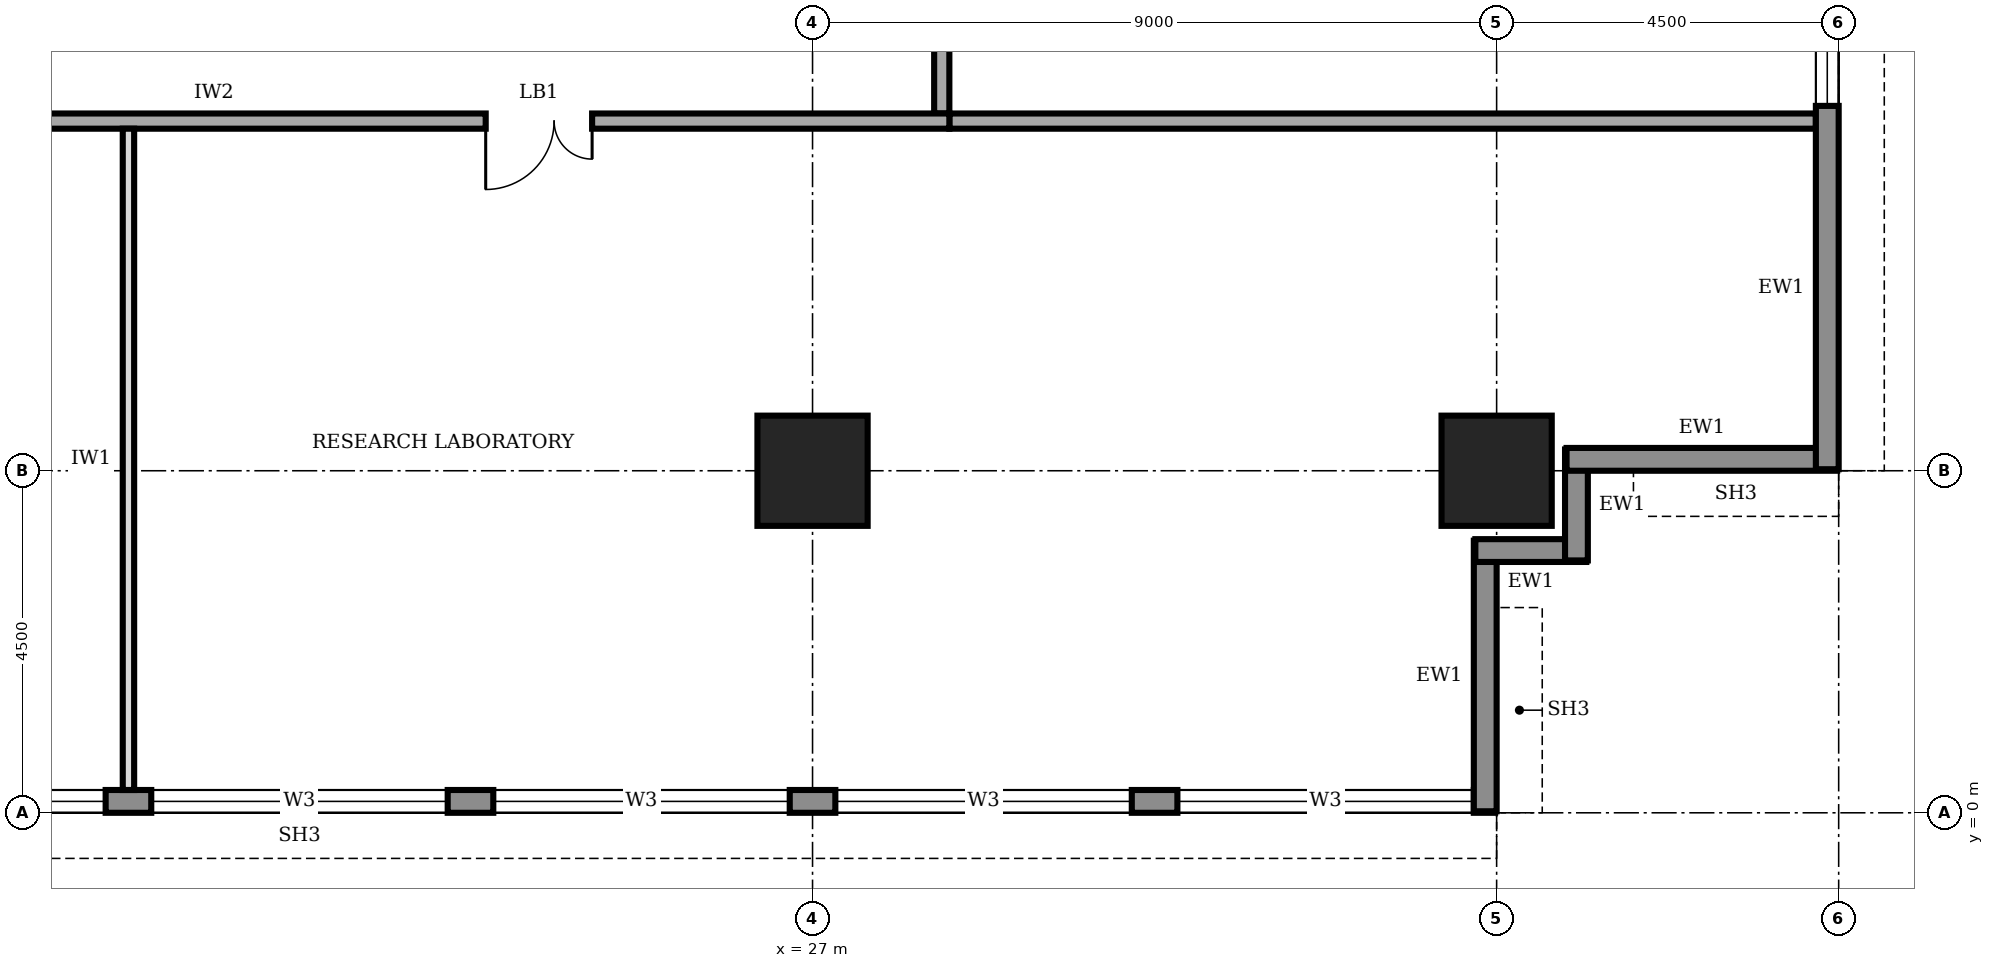
"""IFC4 building model, lengths in metres.
Left out: names, types, materials, properties, quantities, classifications, styles, units other than length and angle.
Written with IfcOpenShell. Run it as: python <this file> out.ifc"""

import sys

from ifc_helpers import new_model, si_unit, direction, frame, frame_2d, origin, origin_2d, place, context, subcontext, project, spatial, rectangle, extrude, element, fill, save


model = new_model("IFC4")
c1 = context("Model", 3, precision=1e-05, world=origin(), true_north=direction((0.0, 1.0)))
c2 = subcontext(c1, "Body", "Model", "MODEL_VIEW")
j1 = project(units=[si_unit("LENGTHUNIT", "METRE"), si_unit("PLANEANGLEUNIT", "RADIAN")], contexts=[c1])
p1 = place(None, origin())
s1 = spatial("IfcSite", under=j1, at=p1, CompositionType="ELEMENT")
p2 = place(p1, origin())
s2 = spatial("IfcBuilding", under=s1, at=p2, CompositionType="ELEMENT")
p3 = place(p2, frame((0.0, 0.0, 253.0)))
s3 = spatial("IfcBuildingStorey", under=s2, at=p3, CompositionType="ELEMENT", Elevation=253.0)
for number, where, z_axis, x_axis in (
    (1, (27.0, 4.5, 0.0), (0.0, 0.0, 1.0), (1.0, 0.0, 0.0)),
    (2, (36.0, 4.5, 0.0), (0.0, 0.0, 1.0), (1.0, 0.0, 0.0)),
):
    element("IfcColumn", number, at=place(p3, frame(where, z_axis=z_axis, x_axis=x_axis)), inside=s3, PredefinedType="COLUMN", context=c2, shape_type="SweptSolid", body=[
        extrude(rectangle(XDim=1.45, YDim=1.45, at=origin_2d()), origin(), (0.0, 0.0, 1.0), 4.0),
    ])
p4 = place(p3, frame((4.52, 0.15, 0.0), z_axis=(0.0, 0.0, 1.0), x_axis=(1.0, 0.0, 0.0)))
e3 = element("IfcWall", 3, at=p4, inside=s3, PredefinedType="STANDARD", context=c2, shape_type="SweptSolid", body=[
    extrude(rectangle(XDim=31.46, YDim=0.3, at=frame_2d((15.73, 0.0))), origin(), (0.0, 0.0, 1.0), 3.75),
])
p5 = place(p4, frame((4.78, 0.0, 0.95)))
e4 = element("IfcOpeningElement", 4, at=p5, cuts=e3, PredefinedType="OPENING", context=c2, shape_type="SweptSolid", body=[
    extrude(rectangle(XDim=3.9, YDim=1.8, at=frame_2d((1.95, 0.9))), frame((0.0, 0.16, 0.0), z_axis=(0.0, -1.0, 0.0), x_axis=(1.0, 0.0, 0.0)), (0.0, 0.0, 1.0), 0.32),
])
p6 = place(p4, frame((9.28, 0.0, 0.95)))
e5 = element("IfcOpeningElement", 5, at=p6, cuts=e3, PredefinedType="OPENING", context=c2, shape_type="SweptSolid", body=[
    extrude(rectangle(XDim=3.9, YDim=1.8, at=frame_2d((1.95, 0.9))), frame((0.0, 0.16, 0.0), z_axis=(0.0, -1.0, 0.0), x_axis=(1.0, 0.0, 0.0)), (0.0, 0.0, 1.0), 0.32),
])
p7 = place(p4, frame((13.78, 0.0, 0.95)))
e6 = element("IfcOpeningElement", 6, at=p7, cuts=e3, PredefinedType="OPENING", context=c2, shape_type="SweptSolid", body=[
    extrude(rectangle(XDim=3.9, YDim=1.8, at=frame_2d((1.95, 0.9))), frame((0.0, 0.16, 0.0), z_axis=(0.0, -1.0, 0.0), x_axis=(1.0, 0.0, 0.0)), (0.0, 0.0, 1.0), 0.32),
])
p8 = place(p4, frame((18.28, 0.0, 0.95)))
e7 = element("IfcOpeningElement", 7, at=p8, cuts=e3, PredefinedType="OPENING", context=c2, shape_type="SweptSolid", body=[
    extrude(rectangle(XDim=3.9, YDim=1.8, at=frame_2d((1.95, 0.9))), frame((0.0, 0.16, 0.0), z_axis=(0.0, -1.0, 0.0), x_axis=(1.0, 0.0, 0.0)), (0.0, 0.0, 1.0), 0.32),
])
p9 = place(p4, frame((22.78, 0.0, 0.95)))
e8 = element("IfcOpeningElement", 8, at=p9, cuts=e3, PredefinedType="OPENING", context=c2, shape_type="SweptSolid", body=[
    extrude(rectangle(XDim=3.9, YDim=1.8, at=frame_2d((1.95, 0.9))), frame((0.0, 0.16, 0.0), z_axis=(0.0, -1.0, 0.0), x_axis=(1.0, 0.0, 0.0)), (0.0, 0.0, 1.0), 0.32),
])
p10 = place(p4, frame((27.28, 0.0, 0.95)))
e9 = element("IfcOpeningElement", 9, at=p10, cuts=e3, PredefinedType="OPENING", context=c2, shape_type="SweptSolid", body=[
    extrude(rectangle(XDim=3.9, YDim=1.8, at=frame_2d((1.95, 0.9))), frame((0.0, 0.16, 0.0), z_axis=(0.0, -1.0, 0.0), x_axis=(1.0, 0.0, 0.0)), (0.0, 0.0, 1.0), 0.32),
])
p11 = place(p3, frame((35.85, 0.02, 0.0), z_axis=(0.0, 0.0, 1.0), x_axis=(0.0, 1.0, 0.0)))
e10 = element("IfcWall", 10, at=p11, inside=s3, PredefinedType="STANDARD", context=c2, shape_type="SweptSolid", body=[
    extrude(rectangle(XDim=3.56, YDim=0.3, at=frame_2d((1.78, 0.0))), origin(), (0.0, 0.0, 1.0), 2.85),
])
for number, where, z_axis, x_axis in (
    (11, (35.72, 3.45, 0.0), (0.0, 0.0, 1.0), (1.0, 0.0, 0.0)),
    (12, (37.05, 3.32, 0.0), (0.0, 0.0, 1.0), (0.0, 1.0, 0.0)),
):
    element("IfcWall", number, at=place(p3, frame(where, z_axis=z_axis, x_axis=x_axis)), inside=s3, PredefinedType="STANDARD", context=c2, shape_type="SweptSolid", body=[
        extrude(rectangle(XDim=1.46, YDim=0.3, at=frame_2d((0.73, 0.0))), origin(), (0.0, 0.0, 1.0), 3.75),
    ])
p12 = place(p3, frame((36.92, 4.65, 0.0), z_axis=(0.0, 0.0, 1.0), x_axis=(1.0, 0.0, 0.0)))
e13 = element("IfcWall", 13, at=p12, inside=s3, PredefinedType="STANDARD", context=c2, shape_type="SweptSolid", body=[
    extrude(rectangle(XDim=3.56, YDim=0.3, at=frame_2d((1.78, 0.0))), origin(), (0.0, 0.0, 1.0), 2.85),
])
p13 = place(p3, frame((40.35, 4.52, 0.0), z_axis=(0.0, 0.0, 1.0), x_axis=(0.0, 1.0, 0.0)))
e14 = element("IfcWall", 14, at=p13, inside=s3, PredefinedType="STANDARD", context=c2, shape_type="SweptSolid", body=[
    extrude(rectangle(XDim=31.46, YDim=0.3, at=frame_2d((15.73, 0.0))), origin(), (0.0, 0.0, 1.0), 3.75),
])
p14 = place(p13, frame((4.78, 0.0, 0.95)))
e15 = element("IfcOpeningElement", 15, at=p14, cuts=e14, PredefinedType="OPENING", context=c2, shape_type="SweptSolid", body=[
    extrude(rectangle(XDim=3.9, YDim=1.8, at=frame_2d((1.95, 0.9))), frame((0.0, 0.16, 0.0), z_axis=(0.0, -1.0, 0.0), x_axis=(1.0, 0.0, 0.0)), (0.0, 0.0, 1.0), 0.32),
])
p15 = place(p13, frame((9.28, 0.0, 0.95)))
e16 = element("IfcOpeningElement", 16, at=p15, cuts=e14, PredefinedType="OPENING", context=c2, shape_type="SweptSolid", body=[
    extrude(rectangle(XDim=3.9, YDim=1.8, at=frame_2d((1.95, 0.9))), frame((0.0, 0.16, 0.0), z_axis=(0.0, -1.0, 0.0), x_axis=(1.0, 0.0, 0.0)), (0.0, 0.0, 1.0), 0.32),
])
p16 = place(p13, frame((13.78, 0.0, 0.95)))
e17 = element("IfcOpeningElement", 17, at=p16, cuts=e14, PredefinedType="OPENING", context=c2, shape_type="SweptSolid", body=[
    extrude(rectangle(XDim=3.9, YDim=1.8, at=frame_2d((1.95, 0.9))), frame((0.0, 0.16, 0.0), z_axis=(0.0, -1.0, 0.0), x_axis=(1.0, 0.0, 0.0)), (0.0, 0.0, 1.0), 0.32),
])
p17 = place(p13, frame((18.28, 0.0, 0.95)))
e18 = element("IfcOpeningElement", 18, at=p17, cuts=e14, PredefinedType="OPENING", context=c2, shape_type="SweptSolid", body=[
    extrude(rectangle(XDim=3.9, YDim=1.8, at=frame_2d((1.95, 0.9))), frame((0.0, 0.16, 0.0), z_axis=(0.0, -1.0, 0.0), x_axis=(1.0, 0.0, 0.0)), (0.0, 0.0, 1.0), 0.32),
])
p18 = place(p13, frame((22.78, 0.0, 0.95)))
e19 = element("IfcOpeningElement", 19, at=p18, cuts=e14, PredefinedType="OPENING", context=c2, shape_type="SweptSolid", body=[
    extrude(rectangle(XDim=3.9, YDim=1.8, at=frame_2d((1.95, 0.9))), frame((0.0, 0.16, 0.0), z_axis=(0.0, -1.0, 0.0), x_axis=(1.0, 0.0, 0.0)), (0.0, 0.0, 1.0), 0.32),
])
p19 = place(p13, frame((27.28, 0.0, 0.95)))
e20 = element("IfcOpeningElement", 20, at=p19, cuts=e14, PredefinedType="OPENING", context=c2, shape_type="SweptSolid", body=[
    extrude(rectangle(XDim=3.9, YDim=1.8, at=frame_2d((1.95, 0.9))), frame((0.0, 0.16, 0.0), z_axis=(0.0, -1.0, 0.0), x_axis=(1.0, 0.0, 0.0)), (0.0, 0.0, 1.0), 0.32),
])
p20 = place(p3, frame((11.9, 9.1, 0.0), z_axis=(0.0, 0.0, 1.0), x_axis=(1.0, 0.0, 0.0)))
e21 = element("IfcWall", 21, at=p20, inside=s3, PredefinedType="SOLIDWALL", context=c2, shape_type="SweptSolid", body=[
    extrude(rectangle(XDim=16.9, YDim=0.2, at=frame_2d((8.45, 0.0))), origin(), (0.0, 0.0, 1.0), 3.75),
])
p21 = place(p20, frame((2.25, 0.0, 0.0)))
e22 = element("IfcOpeningElement", 22, at=p21, cuts=e21, PredefinedType="OPENING", context=c2, shape_type="SweptSolid", body=[
    extrude(rectangle(XDim=1.4, YDim=2.1, at=frame_2d((0.7, 1.05))), frame((0.0, 0.11, 0.0), z_axis=(0.0, -1.0, 0.0), x_axis=(1.0, 0.0, 0.0)), (0.0, 0.0, 1.0), 0.22),
])
p22 = place(p20, frame((10.8, 0.0, 0.0)))
e23 = element("IfcOpeningElement", 23, at=p22, cuts=e21, PredefinedType="OPENING", context=c2, shape_type="SweptSolid", body=[
    extrude(rectangle(XDim=1.4, YDim=2.1, at=frame_2d((0.7, 1.05))), frame((0.0, 0.11, 0.0), z_axis=(0.0, -1.0, 0.0), x_axis=(1.0, 0.0, 0.0)), (0.0, 0.0, 1.0), 0.22),
])
p23 = place(p3, frame((28.7, 9.2, 0.0), z_axis=(0.0, 0.0, 1.0), x_axis=(0.0, 1.0, 0.0)))
e24 = element("IfcWall", 24, at=p23, inside=s3, PredefinedType="SOLIDWALL", context=c2, shape_type="SweptSolid", body=[
    extrude(rectangle(XDim=22.3, YDim=0.2, at=frame_2d((11.15, 0.0))), origin(), (0.0, 0.0, 1.0), 3.75),
])
p24 = place(p23, frame((1.55, 0.0, 0.0)))
e25 = element("IfcOpeningElement", 25, at=p24, cuts=e24, PredefinedType="OPENING", context=c2, shape_type="SweptSolid", body=[
    extrude(rectangle(XDim=1.0, YDim=2.1, at=frame_2d((0.5, 1.05))), frame((0.0, 0.11, 0.0), z_axis=(0.0, -1.0, 0.0), x_axis=(1.0, 0.0, 0.0)), (0.0, 0.0, 1.0), 0.22),
])
p25 = place(p23, frame((6.05, 0.0, 0.0)))
e26 = element("IfcOpeningElement", 26, at=p25, cuts=e24, PredefinedType="OPENING", context=c2, shape_type="SweptSolid", body=[
    extrude(rectangle(XDim=1.0, YDim=2.1, at=frame_2d((0.5, 1.05))), frame((0.0, 0.11, 0.0), z_axis=(0.0, -1.0, 0.0), x_axis=(1.0, 0.0, 0.0)), (0.0, 0.0, 1.0), 0.22),
])
p26 = place(p23, frame((10.55, 0.0, 0.0)))
e27 = element("IfcOpeningElement", 27, at=p26, cuts=e24, PredefinedType="OPENING", context=c2, shape_type="SweptSolid", body=[
    extrude(rectangle(XDim=1.0, YDim=2.1, at=frame_2d((0.5, 1.05))), frame((0.0, 0.11, 0.0), z_axis=(0.0, -1.0, 0.0), x_axis=(1.0, 0.0, 0.0)), (0.0, 0.0, 1.0), 0.22),
])
p27 = place(p23, frame((15.05, 0.0, 0.0)))
e28 = element("IfcOpeningElement", 28, at=p27, cuts=e24, PredefinedType="OPENING", context=c2, shape_type="SweptSolid", body=[
    extrude(rectangle(XDim=1.0, YDim=2.1, at=frame_2d((0.5, 1.05))), frame((0.0, 0.11, 0.0), z_axis=(0.0, -1.0, 0.0), x_axis=(1.0, 0.0, 0.0)), (0.0, 0.0, 1.0), 0.22),
])
p28 = place(p23, frame((19.55, 0.0, 0.0)))
e29 = element("IfcOpeningElement", 29, at=p28, cuts=e24, PredefinedType="OPENING", context=c2, shape_type="SweptSolid", body=[
    extrude(rectangle(XDim=1.0, YDim=2.1, at=frame_2d((0.5, 1.05))), frame((0.0, 0.11, 0.0), z_axis=(0.0, -1.0, 0.0), x_axis=(1.0, 0.0, 0.0)), (0.0, 0.0, 1.0), 0.22),
])
p29 = place(p3, frame((28.8, 9.1, 0.0), z_axis=(0.0, 0.0, 1.0), x_axis=(1.0, 0.0, 0.0)))
e30 = element("IfcWall", 30, at=p29, inside=s3, PredefinedType="SOLIDWALL", context=c2, shape_type="SweptSolid", body=[
    extrude(rectangle(XDim=11.4, YDim=0.2, at=frame_2d((5.7, 0.0))), origin(), (0.0, 0.0, 1.0), 3.75),
])
p30 = place(p3, frame((18.0, 0.3, 0.0), z_axis=(0.0, 0.0, 1.0), x_axis=(0.0, 1.0, 0.0)))
e31 = element("IfcWall", 31, at=p30, inside=s3, PredefinedType="PARTITIONING", context=c2, shape_type="SweptSolid", body=[
    extrude(rectangle(XDim=8.7, YDim=0.15, at=frame_2d((4.35, 0.0))), origin(), (0.0, 0.0, 1.0), 3.75),
])
p31 = place(p6, origin())
e32 = element("IfcWindow", 32, at=p31, inside=s3, PartitioningType="SINGLE_PANEL", PredefinedType="WINDOW", context=c2, shape_type="SweptSolid", body=[
    extrude(rectangle(XDim=3.9, YDim=1.8, at=frame_2d((1.95, 0.9))), frame((0.0, 0.03, 0.0), z_axis=(0.0, -1.0, 0.0), x_axis=(1.0, 0.0, 0.0)), (0.0, 0.0, 1.0), 0.06),
])
fill(e5, e32)
p32 = place(p7, origin())
e33 = element("IfcWindow", 33, at=p32, inside=s3, PartitioningType="SINGLE_PANEL", PredefinedType="WINDOW", context=c2, shape_type="SweptSolid", body=[
    extrude(rectangle(XDim=3.9, YDim=1.8, at=frame_2d((1.95, 0.9))), frame((0.0, 0.03, 0.0), z_axis=(0.0, -1.0, 0.0), x_axis=(1.0, 0.0, 0.0)), (0.0, 0.0, 1.0), 0.06),
])
fill(e6, e33)
p33 = place(p8, origin())
e34 = element("IfcWindow", 34, at=p33, inside=s3, PartitioningType="SINGLE_PANEL", PredefinedType="WINDOW", context=c2, shape_type="SweptSolid", body=[
    extrude(rectangle(XDim=3.9, YDim=1.8, at=frame_2d((1.95, 0.9))), frame((0.0, 0.03, 0.0), z_axis=(0.0, -1.0, 0.0), x_axis=(1.0, 0.0, 0.0)), (0.0, 0.0, 1.0), 0.06),
])
fill(e7, e34)
p34 = place(p9, origin())
e35 = element("IfcWindow", 35, at=p34, inside=s3, PartitioningType="SINGLE_PANEL", PredefinedType="WINDOW", context=c2, shape_type="SweptSolid", body=[
    extrude(rectangle(XDim=3.9, YDim=1.8, at=frame_2d((1.95, 0.9))), frame((0.0, 0.03, 0.0), z_axis=(0.0, -1.0, 0.0), x_axis=(1.0, 0.0, 0.0)), (0.0, 0.0, 1.0), 0.06),
])
fill(e8, e35)
p35 = place(p10, origin())
e36 = element("IfcWindow", 36, at=p35, inside=s3, PartitioningType="SINGLE_PANEL", PredefinedType="WINDOW", context=c2, shape_type="SweptSolid", body=[
    extrude(rectangle(XDim=3.9, YDim=1.8, at=frame_2d((1.95, 0.9))), frame((0.0, 0.03, 0.0), z_axis=(0.0, -1.0, 0.0), x_axis=(1.0, 0.0, 0.0)), (0.0, 0.0, 1.0), 0.06),
])
fill(e9, e36)
p36 = place(p14, origin())
e37 = element("IfcWindow", 37, at=p36, inside=s3, PartitioningType="SINGLE_PANEL", PredefinedType="WINDOW", context=c2, shape_type="SweptSolid", body=[
    extrude(rectangle(XDim=3.9, YDim=1.8, at=frame_2d((1.95, 0.9))), frame((0.0, 0.03, 0.0), z_axis=(0.0, -1.0, 0.0), x_axis=(1.0, 0.0, 0.0)), (0.0, 0.0, 1.0), 0.06),
])
fill(e15, e37)
p37 = place(p22, frame((1.4, 0.0, 0.0), z_axis=(0.0, 0.0, 1.0), x_axis=(-1.0, 0.0, 0.0)))
e38 = element("IfcDoor", 38, at=p37, inside=s3, OperationType="DOUBLE_DOOR_SINGLE_SWING", PredefinedType="DOOR", context=c2, shape_type="SweptSolid", body=[
    extrude(rectangle(XDim=1.4, YDim=2.1, at=frame_2d((0.7, 1.05))), frame((0.0, 0.025, 0.0), z_axis=(0.0, -1.0, 0.0), x_axis=(1.0, 0.0, 0.0)), (0.0, 0.0, 1.0), 0.05),
])
fill(e23, e38)
save(model, sys.argv[1])
